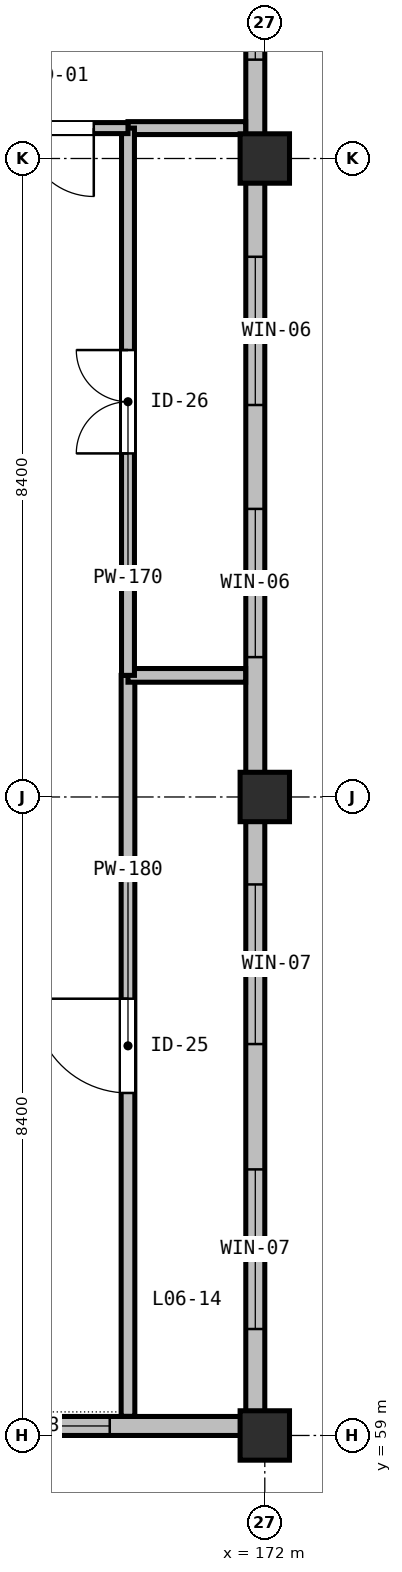
"""IFC4 building model, lengths in metres.
Left out: names, types, materials, properties, quantities, classifications, styles, units other than length and angle.
Written with IfcOpenShell. Run it as: python <this file> out.ifc"""

import sys

from ifc_helpers import new_model, si_unit, direction, frame, frame_2d, origin, origin_2d, place, context, subcontext, project, spatial, rectangle, extrude, element, fill, save


model = new_model("IFC4")
c1 = context("Model", 3, precision=1e-05, world=origin(), true_north=direction((0.0, 1.0)))
c2 = subcontext(c1, "Body", "Model", "MODEL_VIEW")
j1 = project(units=[si_unit("LENGTHUNIT", "METRE"), si_unit("PLANEANGLEUNIT", "RADIAN")], contexts=[c1])
p1 = place(None, origin())
s1 = spatial("IfcSite", under=j1, at=p1, CompositionType="ELEMENT")
p2 = place(p1, origin())
s2 = spatial("IfcBuilding", under=s1, at=p2, CompositionType="ELEMENT")
p3 = place(p2, frame((0.0, 0.0, 28.5)))
s3 = spatial("IfcBuildingStorey", under=s2, at=p3, CompositionType="ELEMENT", Elevation=28.5)
for number, where, z_axis, x_axis in (
    (1, (172.0, 59.0, 0.0), (0.0, 0.0, 1.0), (1.0, 0.0, 0.0)),
    (2, (172.0, 67.4, 0.0), (0.0, 0.0, 1.0), (1.0, 0.0, 0.0)),
    (3, (172.0, 75.8, 0.0), (0.0, 0.0, 1.0), (1.0, 0.0, 0.0)),
):
    element("IfcColumn", number, at=place(p3, frame(where, z_axis=z_axis, x_axis=x_axis)), inside=s3, PredefinedType="COLUMN", context=c2, shape_type="SweptSolid", body=[
        extrude(rectangle(XDim=0.65, YDim=0.65, at=origin_2d()), origin(), (0.0, 0.0, 1.0), 4.2),
    ])
p4 = place(p3, frame((171.875, 83.95, 0.0), z_axis=(0.0, 0.0, 1.0), x_axis=(0.0, -1.0, 0.0)))
e4 = element("IfcWall", 4, at=p4, inside=s3, PredefinedType="STANDARD", context=c2, shape_type="SweptSolid", body=[
    extrude(rectangle(XDim=8.15, YDim=0.25, at=frame_2d((4.075, 0.0))), origin(), (0.0, 0.0, 1.0), 3.585),
])
p5 = place(p4, frame((1.301, 0.0, 0.9)))
e5 = element("IfcOpeningElement", 5, at=p5, cuts=e4, PredefinedType="OPENING", context=c2, shape_type="SweptSolid", body=[
    extrude(rectangle(XDim=1.8, YDim=2.1, at=frame_2d((0.9, 1.05))), frame((0.0, 0.135, 0.0), z_axis=(0.0, -1.0, 0.0), x_axis=(1.0, 0.0, 0.0)), (0.0, 0.0, 1.0), 0.27),
])
p6 = place(p4, frame((5.05, 0.0, 0.9)))
e6 = element("IfcOpeningElement", 6, at=p6, cuts=e4, PredefinedType="OPENING", context=c2, shape_type="SweptSolid", body=[
    extrude(rectangle(XDim=1.8, YDim=2.1, at=frame_2d((0.9, 1.05))), frame((0.0, 0.135, 0.0), z_axis=(0.0, -1.0, 0.0), x_axis=(1.0, 0.0, 0.0)), (0.0, 0.0, 1.0), 0.27),
])
p7 = place(p3, frame((171.875, 75.8, 0.0), z_axis=(0.0, 0.0, 1.0), x_axis=(0.0, -1.0, 0.0)))
e7 = element("IfcWall", 7, at=p7, inside=s3, PredefinedType="STANDARD", context=c2, shape_type="SweptSolid", body=[
    extrude(rectangle(XDim=8.4, YDim=0.25, at=frame_2d((4.2, 0.0))), origin(), (0.0, 0.0, 1.0), 3.585),
])
p8 = place(p7, frame((1.293, 0.0, 0.9)))
e8 = element("IfcOpeningElement", 8, at=p8, cuts=e7, PredefinedType="OPENING", context=c2, shape_type="SweptSolid", body=[
    extrude(rectangle(XDim=1.95, YDim=2.1, at=frame_2d((0.975, 1.05))), frame((0.0, 0.135, 0.0), z_axis=(0.0, -1.0, 0.0), x_axis=(1.0, 0.0, 0.0)), (0.0, 0.0, 1.0), 0.27),
])
p9 = place(p7, frame((4.61, 0.0, 0.9)))
e9 = element("IfcOpeningElement", 9, at=p9, cuts=e7, PredefinedType="OPENING", context=c2, shape_type="SweptSolid", body=[
    extrude(rectangle(XDim=1.95, YDim=2.1, at=frame_2d((0.975, 1.05))), frame((0.0, 0.135, 0.0), z_axis=(0.0, -1.0, 0.0), x_axis=(1.0, 0.0, 0.0)), (0.0, 0.0, 1.0), 0.27),
])
p10 = place(p3, frame((171.875, 67.4, 0.0), z_axis=(0.0, 0.0, 1.0), x_axis=(0.0, -1.0, 0.0)))
e10 = element("IfcWall", 10, at=p10, inside=s3, PredefinedType="STANDARD", context=c2, shape_type="SweptSolid", body=[
    extrude(rectangle(XDim=8.15, YDim=0.25, at=frame_2d((4.075, 0.0))), origin(), (0.0, 0.0, 1.0), 3.585),
])
p11 = place(p10, frame((1.15, 0.0, 0.9)))
e11 = element("IfcOpeningElement", 11, at=p11, cuts=e10, PredefinedType="OPENING", context=c2, shape_type="SweptSolid", body=[
    extrude(rectangle(XDim=2.1, YDim=2.1, at=frame_2d((1.05, 1.05))), frame((0.0, 0.135, 0.0), z_axis=(0.0, -1.0, 0.0), x_axis=(1.0, 0.0, 0.0)), (0.0, 0.0, 1.0), 0.27),
])
p12 = place(p10, frame((4.899, 0.0, 0.9)))
e12 = element("IfcOpeningElement", 12, at=p12, cuts=e10, PredefinedType="OPENING", context=c2, shape_type="SweptSolid", body=[
    extrude(rectangle(XDim=2.1, YDim=2.1, at=frame_2d((1.05, 1.05))), frame((0.0, 0.135, 0.0), z_axis=(0.0, -1.0, 0.0), x_axis=(1.0, 0.0, 0.0)), (0.0, 0.0, 1.0), 0.27),
])
p13 = place(p3, frame((172.0, 59.125, 0.0), z_axis=(0.0, 0.0, 1.0), x_axis=(-1.0, 0.0, 0.0)))
e13 = element("IfcWall", 13, at=p13, inside=s3, PredefinedType="STANDARD", context=c2, shape_type="SweptSolid", body=[
    extrude(rectangle(XDim=6.8, YDim=0.25, at=frame_2d((3.4, 0.0))), origin(), (0.0, 0.0, 1.0), 3.435),
])
p14 = place(p13, frame((2.04, 0.0, 0.9)))
e14 = element("IfcOpeningElement", 14, at=p14, cuts=e13, PredefinedType="OPENING", context=c2, shape_type="SweptSolid", body=[
    extrude(rectangle(XDim=2.25, YDim=2.1, at=frame_2d((1.125, 1.05))), frame((0.0, 0.135, 0.0), z_axis=(0.0, -1.0, 0.0), x_axis=(1.0, 0.0, 0.0)), (0.0, 0.0, 1.0), 0.27),
])
p15 = place(p3, frame((170.2, 59.252, 0.0), z_axis=(0.0, 0.0, 1.0), x_axis=(0.0, 1.0, 0.0)))
e15 = element("IfcWall", 15, at=p15, inside=s3, PredefinedType="PARTITIONING", context=c2, shape_type="SweptSolid", body=[
    extrude(rectangle(XDim=9.748, YDim=0.18, at=frame_2d((4.874, 0.0))), origin(), (0.0, 0.0, 1.0), 3.585),
])
p16 = place(p15, frame((4.254, 0.0, 0.0)))
e16 = element("IfcOpeningElement", 16, at=p16, cuts=e15, PredefinedType="OPENING", context=c2, shape_type="SweptSolid", body=[
    extrude(rectangle(XDim=1.24, YDim=2.14, at=frame_2d((0.62, 1.07))), frame((0.0, 0.1, 0.0), z_axis=(0.0, -1.0, 0.0), x_axis=(1.0, 0.0, 0.0)), (0.0, 0.0, 1.0), 0.2),
])
p17 = place(p3, frame((170.2, 69.0, 0.0), z_axis=(0.0, 0.0, 1.0), x_axis=(1.0, 0.0, 0.0)))
e17 = element("IfcWall", 17, at=p17, inside=s3, PredefinedType="PARTITIONING", context=c2, shape_type="SweptSolid", body=[
    extrude(rectangle(XDim=1.548, YDim=0.18, at=frame_2d((0.774, 0.0))), origin(), (0.0, 0.0, 1.0), 3.635),
])
p18 = place(p3, frame((170.2, 76.2, 0.0), z_axis=(0.0, 0.0, 1.0), x_axis=(1.0, 0.0, 0.0)))
e18 = element("IfcWall", 18, at=p18, inside=s3, PredefinedType="PARTITIONING", context=c2, shape_type="SweptSolid", body=[
    extrude(rectangle(XDim=1.548, YDim=0.17, at=frame_2d((0.774, 0.0))), origin(), (0.0, 0.0, 1.0), 3.635),
])
p19 = place(p3, frame((170.2, 69.0, 0.0), z_axis=(0.0, 0.0, 1.0), x_axis=(0.0, 1.0, 0.0)))
e19 = element("IfcWall", 19, at=p19, inside=s3, PredefinedType="PARTITIONING", context=c2, shape_type="SweptSolid", body=[
    extrude(rectangle(XDim=7.2, YDim=0.17, at=frame_2d((3.6, 0.0))), origin(), (0.0, 0.0, 1.0), 3.585),
])
p20 = place(p19, frame((2.92, 0.0, 0.0)))
e20 = element("IfcOpeningElement", 20, at=p20, cuts=e19, PredefinedType="OPENING", context=c2, shape_type="SweptSolid", body=[
    extrude(rectangle(XDim=1.36, YDim=2.14, at=frame_2d((0.68, 1.07))), frame((0.0, 0.095, 0.0), z_axis=(0.0, -1.0, 0.0), x_axis=(1.0, 0.0, 0.0)), (0.0, 0.0, 1.0), 0.19),
])
p21 = place(p3, frame((170.2, 76.2, 0.0), z_axis=(0.0, 0.0, 1.0), x_axis=(-1.0, 0.0, 0.0)))
e21 = element("IfcWall", 21, at=p21, inside=s3, PredefinedType="PARTITIONING", context=c2, shape_type="SweptSolid", body=[
    extrude(rectangle(XDim=1.8, YDim=0.145, at=frame_2d((0.9, 0.0))), origin(), (0.0, 0.0, 1.0), 3.735),
])
p22 = place(p21, frame((0.45, 0.0, 0.0)))
e22 = element("IfcOpeningElement", 22, at=p22, cuts=e21, PredefinedType="OPENING", context=c2, shape_type="SweptSolid", body=[
    extrude(rectangle(XDim=0.9, YDim=2.02, at=frame_2d((0.45, 1.01))), frame((0.0, 0.083, 0.0), z_axis=(0.0, -1.0, 0.0), x_axis=(1.0, 0.0, 0.0)), (0.0, 0.0, 1.0), 0.165),
])
p23 = place(p6, origin())
e23 = element("IfcWindow", 23, at=p23, inside=s3, PartitioningType="SINGLE_PANEL", PredefinedType="WINDOW", context=c2, shape_type="SweptSolid", body=[
    extrude(rectangle(XDim=1.8, YDim=2.1, at=frame_2d((0.9, 1.05))), frame((0.0, 0.03, 0.0), z_axis=(0.0, -1.0, 0.0), x_axis=(1.0, 0.0, 0.0)), (0.0, 0.0, 1.0), 0.06),
])
fill(e6, e23)
p24 = place(p8, origin())
e24 = element("IfcWindow", 24, at=p24, inside=s3, PartitioningType="SINGLE_PANEL", PredefinedType="WINDOW", context=c2, shape_type="SweptSolid", body=[
    extrude(rectangle(XDim=1.95, YDim=2.1, at=frame_2d((0.975, 1.05))), frame((0.0, 0.03, 0.0), z_axis=(0.0, -1.0, 0.0), x_axis=(1.0, 0.0, 0.0)), (0.0, 0.0, 1.0), 0.06),
])
fill(e8, e24)
p25 = place(p9, origin())
e25 = element("IfcWindow", 25, at=p25, inside=s3, PartitioningType="SINGLE_PANEL", PredefinedType="WINDOW", context=c2, shape_type="SweptSolid", body=[
    extrude(rectangle(XDim=1.95, YDim=2.1, at=frame_2d((0.975, 1.05))), frame((0.0, 0.03, 0.0), z_axis=(0.0, -1.0, 0.0), x_axis=(1.0, 0.0, 0.0)), (0.0, 0.0, 1.0), 0.06),
])
fill(e9, e25)
p26 = place(p11, origin())
e26 = element("IfcWindow", 26, at=p26, inside=s3, PartitioningType="SINGLE_PANEL", PredefinedType="WINDOW", context=c2, shape_type="SweptSolid", body=[
    extrude(rectangle(XDim=2.1, YDim=2.1, at=frame_2d((1.05, 1.05))), frame((0.0, 0.03, 0.0), z_axis=(0.0, -1.0, 0.0), x_axis=(1.0, 0.0, 0.0)), (0.0, 0.0, 1.0), 0.06),
])
fill(e11, e26)
p27 = place(p12, origin())
e27 = element("IfcWindow", 27, at=p27, inside=s3, PartitioningType="SINGLE_PANEL", PredefinedType="WINDOW", context=c2, shape_type="SweptSolid", body=[
    extrude(rectangle(XDim=2.1, YDim=2.1, at=frame_2d((1.05, 1.05))), frame((0.0, 0.03, 0.0), z_axis=(0.0, -1.0, 0.0), x_axis=(1.0, 0.0, 0.0)), (0.0, 0.0, 1.0), 0.06),
])
fill(e12, e27)
p28 = place(p14, origin())
e28 = element("IfcWindow", 28, at=p28, inside=s3, PartitioningType="SINGLE_PANEL", PredefinedType="WINDOW", context=c2, shape_type="SweptSolid", body=[
    extrude(rectangle(XDim=2.25, YDim=2.1, at=frame_2d((1.125, 1.05))), frame((0.0, 0.03, 0.0), z_axis=(0.0, -1.0, 0.0), x_axis=(1.0, 0.0, 0.0)), (0.0, 0.0, 1.0), 0.06),
])
fill(e14, e28)
p29 = place(p16, origin())
e29 = element("IfcDoor", 29, at=p29, inside=s3, OperationType="SINGLE_SWING_RIGHT", PredefinedType="DOOR", context=c2, shape_type="SweptSolid", body=[
    extrude(rectangle(XDim=1.24, YDim=2.14, at=frame_2d((0.62, 1.07))), frame((0.0, 0.025, 0.0), z_axis=(0.0, -1.0, 0.0), x_axis=(1.0, 0.0, 0.0)), (0.0, 0.0, 1.0), 0.05),
])
fill(e16, e29)
p30 = place(p20, origin())
e30 = element("IfcDoor", 30, at=p30, inside=s3, OperationType="DOUBLE_DOOR_SINGLE_SWING", PredefinedType="DOOR", context=c2, shape_type="SweptSolid", body=[
    extrude(rectangle(XDim=1.36, YDim=2.14, at=frame_2d((0.68, 1.07))), frame((0.0, 0.025, 0.0), z_axis=(0.0, -1.0, 0.0), x_axis=(1.0, 0.0, 0.0)), (0.0, 0.0, 1.0), 0.05),
])
fill(e20, e30)
p31 = place(p22, origin())
e31 = element("IfcDoor", 31, at=p31, inside=s3, OperationType="SINGLE_SWING_LEFT", PredefinedType="DOOR", context=c2, shape_type="SweptSolid", body=[
    extrude(rectangle(XDim=0.9, YDim=2.02, at=frame_2d((0.45, 1.01))), frame((0.0, 0.025, 0.0), z_axis=(0.0, -1.0, 0.0), x_axis=(1.0, 0.0, 0.0)), (0.0, 0.0, 1.0), 0.05),
])
fill(e22, e31)
save(model, sys.argv[1])
